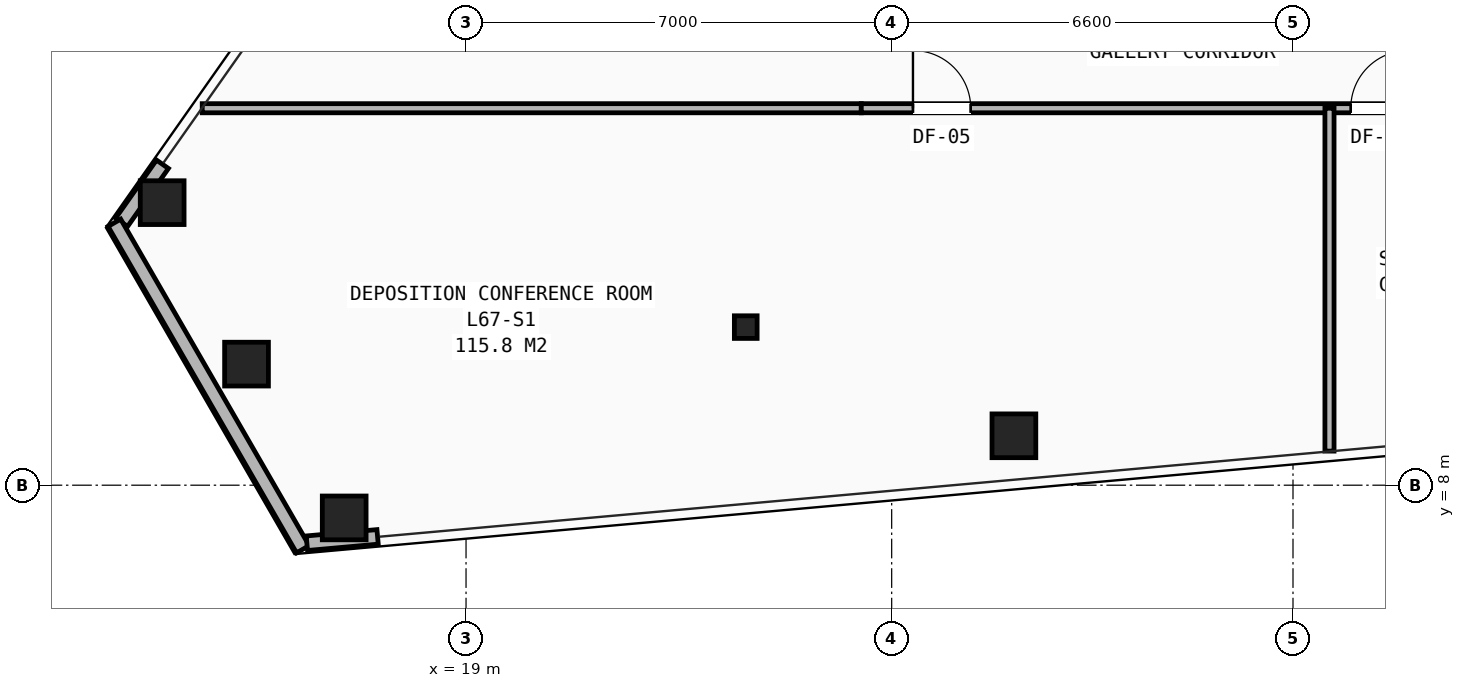
"""IFC4 building model, lengths in metres.
Left out: names, types, materials, properties, quantities, classifications, styles, units other than length and angle.
Written with IfcOpenShell. Run it as: python <this file> out.ifc"""

import sys

from ifc_helpers import new_model, si_unit, direction, frame, frame_2d, origin, origin_2d, place, context, subcontext, project, spatial, rectangle, hollow_rectangle, i_section, extrude, element, fill, save


model = new_model("IFC4")
c1 = context("Model", 3, precision=1e-05, world=origin(), true_north=direction((0.0, 1.0)))
c2 = subcontext(c1, "Body", "Model", "MODEL_VIEW")
j1 = project(units=[si_unit("LENGTHUNIT", "METRE"), si_unit("PLANEANGLEUNIT", "RADIAN")], contexts=[c1])
p1 = place(None, origin())
s1 = spatial("IfcSite", under=j1, at=p1, CompositionType="ELEMENT")
p2 = place(p1, origin())
s2 = spatial("IfcBuilding", under=s1, at=p2, CompositionType="ELEMENT")
p3 = place(p2, frame((0.0, 0.0, 236.4)))
s3 = spatial("IfcBuildingStorey", under=s2, at=p3, CompositionType="ELEMENT", Elevation=236.4)
p4 = place(p3, frame((23.6, 10.6, 0.0), z_axis=(0.0, 0.0, 1.0), x_axis=(1.0, 0.0, 0.0)))
e1 = element("IfcColumn", 1, at=p4, inside=s3, PredefinedType="COLUMN", context=c2, shape_type="SweptSolid", body=[
    extrude(i_section(OverallWidth=0.374, OverallDepth=0.372, WebThickness=0.016, FlangeThickness=0.026, at=origin_2d()), origin(), (0.0, 0.0, 1.0), 3.5),
])
for number, where, z_axis, x_axis in (
    (2, (14.003, 12.647, 0.0), (0.0, 0.0, 1.0), (1.0, 0.0, 0.0)),
    (3, (15.39, 9.991, 0.0), (0.0, 0.0, 1.0), (1.0, 0.0, 0.0)),
    (4, (16.996, 7.462, 0.0), (0.0, 0.0, 1.0), (1.0, 0.0, 0.0)),
    (5, (28.01, 8.812, 0.0), (0.0, 0.0, 1.0), (1.0, 0.0, 0.0)),
):
    element("IfcColumn", number, at=place(p3, frame(where, z_axis=z_axis, x_axis=x_axis)), inside=s3, PredefinedType="COLUMN", context=c2, shape_type="SweptSolid", body=[
        extrude(hollow_rectangle(XDim=0.72, YDim=0.72, WallThickness=0.05, at=origin_2d()), origin(), (0.0, 0.0, 1.0), 3.5),
    ])
p5 = place(p3, frame((14.007, 13.279, 0.0), z_axis=(0.0, 0.0, 1.0), x_axis=(-0.575467507086, -0.817824643972, 0.0)))
e6 = element("IfcWall", 6, at=p5, inside=s3, PredefinedType="SHEAR", context=c2, shape_type="SweptSolid", body=[
    extrude(rectangle(XDim=1.167, YDim=0.24, at=frame_2d((0.584, 0.0))), origin(), (0.0, 0.0, 1.0), 2.623),
])
p6 = place(p3, frame((16.316, 6.947, 0.0), z_axis=(0.0, 0.0, 1.0), x_axis=(-0.500009909098, 0.866019682689, 0.0)))
e7 = element("IfcWall", 7, at=p6, inside=s3, PredefinedType="SHEAR", context=c2, shape_type="SweptSolid", body=[
    extrude(rectangle(XDim=6.2, YDim=0.24, at=frame_2d((3.1, 0.0))), origin(), (0.0, 0.0, 1.0), 2.623),
])
p7 = place(p3, frame((16.383, 7.046, 0.0), z_axis=(0.0, 0.0, 1.0), x_axis=(0.996005555759, 0.08929128119, 0.0)))
e8 = element("IfcWall", 8, at=p7, inside=s3, PredefinedType="SHEAR", context=c2, shape_type="SweptSolid", body=[
    extrude(rectangle(XDim=1.167, YDim=0.24, at=frame_2d((0.584, 0.0))), origin(), (0.0, 0.0, 1.0), 2.623),
])
p8 = place(p3, frame((14.661, 14.2, 0.0), z_axis=(0.0, 0.0, 1.0), x_axis=(1.0, 0.0, 0.0)))
e9 = element("IfcWall", 9, at=p8, inside=s3, PredefinedType="PARTITIONING", context=c2, shape_type="SweptSolid", body=[
    extrude(rectangle(XDim=10.839, YDim=0.15, at=frame_2d((5.419, 0.0))), origin(), (0.0, 0.0, 1.0), 2.292),
])
p9 = place(p3, frame((25.5, 14.2, 0.0), z_axis=(0.0, 0.0, 1.0), x_axis=(1.0, 0.0, 0.0)))
e10 = element("IfcWall", 10, at=p9, inside=s3, PredefinedType="PARTITIONING", context=c2, shape_type="SweptSolid", body=[
    extrude(rectangle(XDim=29.0, YDim=0.15, at=frame_2d((14.5, 0.0))), origin(), (0.0, 0.0, 1.0), 2.292),
])
p10 = place(p9, frame((0.85, 0.0, 0.0)))
e11 = element("IfcOpeningElement", 11, at=p10, cuts=e10, PredefinedType="OPENING", context=c2, shape_type="SweptSolid", body=[
    extrude(rectangle(XDim=0.95, YDim=2.1, at=frame_2d((0.475, 1.05))), frame((0.0, 0.085, 0.0), z_axis=(0.0, -1.0, 0.0), x_axis=(1.0, 0.0, 0.0)), (0.0, 0.0, 1.0), 0.17),
])
p11 = place(p9, frame((8.05, 0.0, 0.0)))
e12 = element("IfcOpeningElement", 12, at=p11, cuts=e10, PredefinedType="OPENING", context=c2, shape_type="SweptSolid", body=[
    extrude(rectangle(XDim=0.95, YDim=2.1, at=frame_2d((0.475, 1.05))), frame((0.0, 0.085, 0.0), z_axis=(0.0, -1.0, 0.0), x_axis=(1.0, 0.0, 0.0)), (0.0, 0.0, 1.0), 0.17),
])
p12 = place(p9, frame((12.35, 0.0, 0.0)))
e13 = element("IfcOpeningElement", 13, at=p12, cuts=e10, PredefinedType="OPENING", context=c2, shape_type="SweptSolid", body=[
    extrude(rectangle(XDim=0.95, YDim=2.1, at=frame_2d((0.475, 1.05))), frame((0.0, 0.085, 0.0), z_axis=(0.0, -1.0, 0.0), x_axis=(1.0, 0.0, 0.0)), (0.0, 0.0, 1.0), 0.17),
])
p13 = place(p9, frame((16.65, 0.0, 0.0)))
e14 = element("IfcOpeningElement", 14, at=p13, cuts=e10, PredefinedType="OPENING", context=c2, shape_type="SweptSolid", body=[
    extrude(rectangle(XDim=0.95, YDim=2.1, at=frame_2d((0.475, 1.05))), frame((0.0, 0.085, 0.0), z_axis=(0.0, -1.0, 0.0), x_axis=(1.0, 0.0, 0.0)), (0.0, 0.0, 1.0), 0.17),
])
p14 = place(p9, frame((19.45, 0.0, 0.0)))
e15 = element("IfcOpeningElement", 15, at=p14, cuts=e10, PredefinedType="OPENING", context=c2, shape_type="SweptSolid", body=[
    extrude(rectangle(XDim=0.95, YDim=2.1, at=frame_2d((0.475, 1.05))), frame((0.0, 0.085, 0.0), z_axis=(0.0, -1.0, 0.0), x_axis=(1.0, 0.0, 0.0)), (0.0, 0.0, 1.0), 0.17),
])
p15 = place(p3, frame((33.2, 8.561, 0.0), z_axis=(0.0, 0.0, 1.0), x_axis=(0.0, 1.0, 0.0)))
e16 = element("IfcWall", 16, at=p15, inside=s3, PredefinedType="PARTITIONING", context=c2, shape_type="SweptSolid", body=[
    extrude(rectangle(XDim=5.639, YDim=0.15, at=frame_2d((2.82, 0.0))), origin(), (0.0, 0.0, 1.0), 2.628),
])
p16 = place(p10, origin())
e17 = element("IfcDoor", 17, at=p16, inside=s3, OperationType="SINGLE_SWING_LEFT", PredefinedType="DOOR", context=c2, shape_type="SweptSolid", body=[
    extrude(rectangle(XDim=0.95, YDim=2.1, at=frame_2d((0.475, 1.05))), frame((0.0, 0.025, 0.0), z_axis=(0.0, -1.0, 0.0), x_axis=(1.0, 0.0, 0.0)), (0.0, 0.0, 1.0), 0.05),
])
fill(e11, e17)
p17 = place(p11, origin())
e18 = element("IfcDoor", 18, at=p17, inside=s3, OperationType="SINGLE_SWING_RIGHT", PredefinedType="DOOR", context=c2, shape_type="SweptSolid", body=[
    extrude(rectangle(XDim=0.95, YDim=2.1, at=frame_2d((0.475, 1.05))), frame((0.0, 0.025, 0.0), z_axis=(0.0, -1.0, 0.0), x_axis=(1.0, 0.0, 0.0)), (0.0, 0.0, 1.0), 0.05),
])
fill(e12, e18)
save(model, sys.argv[1])
